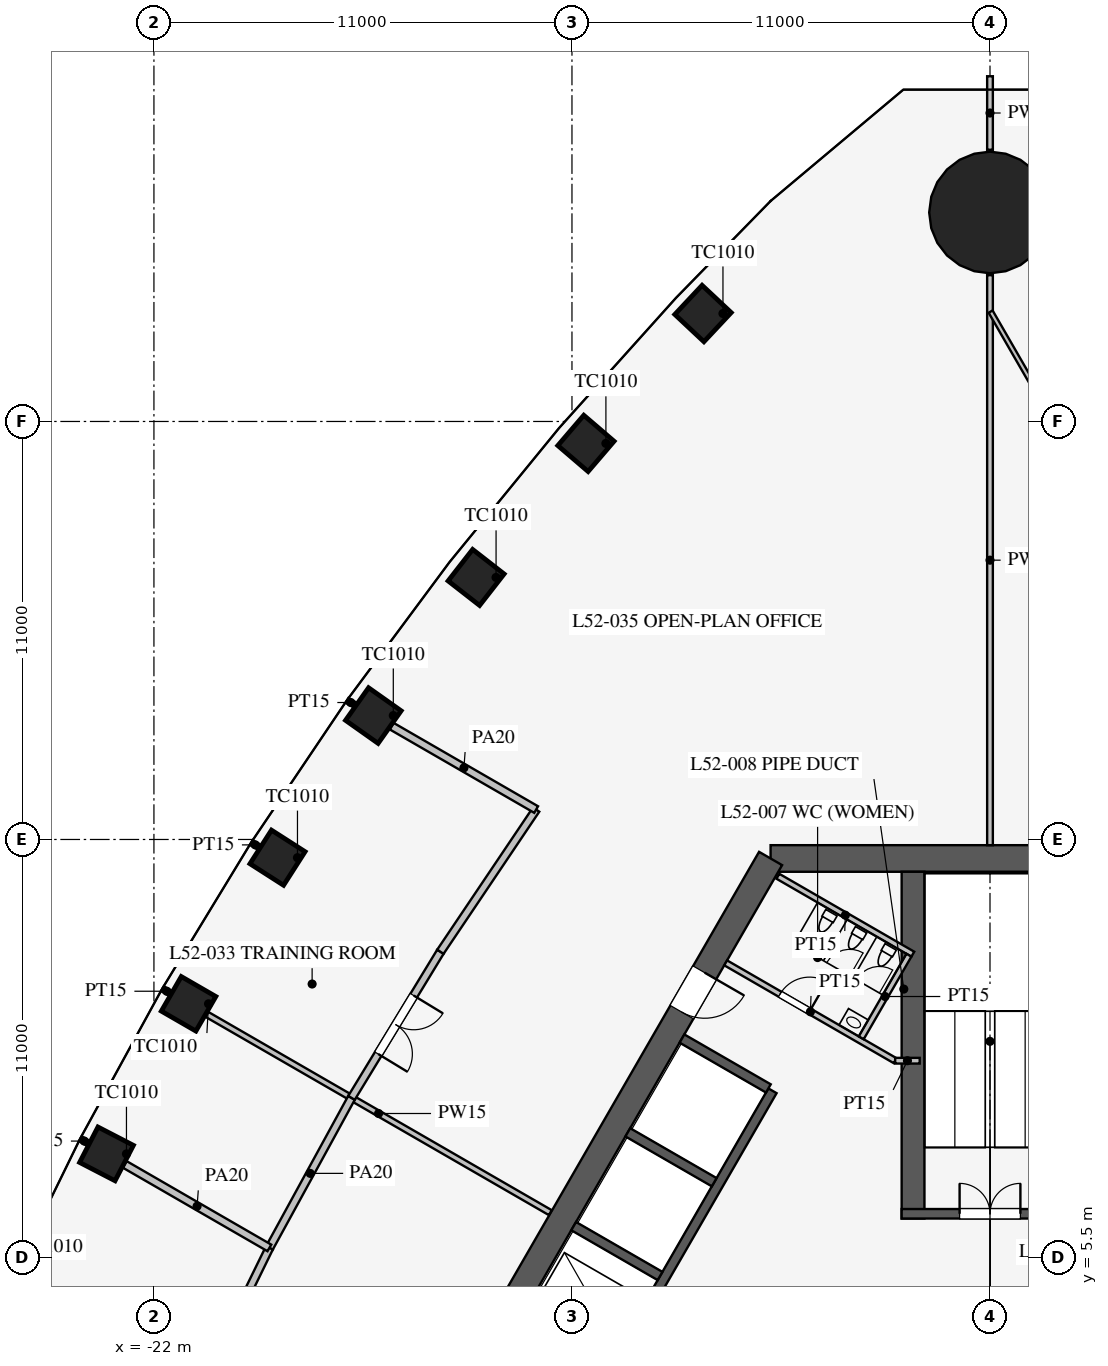
"""IFC4 building model, lengths in metres.
Left out: names, types, materials, properties, quantities, classifications, styles, units other than length and angle.
Written with IfcOpenShell. Run it as: python <this file> out.ifc"""

import sys

from ifc_helpers import new_model, si_unit, direction, frame, frame_2d, origin, origin_2d, place, context, subcontext, project, spatial, rectangle, circle, extrude, element, fill, save


model = new_model("IFC4")
c1 = context("Model", 3, precision=1e-05, world=origin(), true_north=direction((0.0, 1.0)))
c2 = subcontext(c1, "Body", "Model", "MODEL_VIEW")
j1 = project(units=[si_unit("LENGTHUNIT", "METRE"), si_unit("PLANEANGLEUNIT", "RADIAN")], contexts=[c1])
p1 = place(None, origin())
s1 = spatial("IfcSite", under=j1, at=p1, CompositionType="ELEMENT")
p2 = place(p1, origin())
s2 = spatial("IfcBuilding", under=s1, at=p2, CompositionType="ELEMENT")
p3 = place(p2, frame((0.0, 0.0, 227.5)))
s3 = spatial("IfcBuildingStorey", under=s2, at=p3, CompositionType="ELEMENT", Elevation=227.5)
for number, where, z_axis, x_axis in (
    (1, (-7.552, 30.341, 0.0), (0.0, 0.0, 1.0), (-0.684, -0.73, 0.0)),
    (2, (-10.632, 26.923, 0.0), (0.0, 0.0, 1.0), (-0.651, -0.759, 0.0)),
    (3, (-13.522, 23.396, 0.0), (0.0, 0.0, 1.0), (-0.615, -0.789, 0.0)),
    (4, (-16.227, 19.761, 0.0), (0.0, 0.0, 1.0), (-0.577, -0.816, 0.0)),
    (5, (-18.748, 16.02, 0.0), (0.0, 0.0, 1.0), (-0.539, -0.842, 0.0)),
    (6, (-21.088, 12.175, 0.0), (0.0, 0.0, 1.0), (-0.5, -0.866, 0.0)),
    (7, (-23.248, 8.226, 0.0), (0.0, 0.0, 1.0), (-0.46, -0.888, 0.0)),
    (8, (-25.227, 4.172, 0.0), (0.0, 0.0, 1.0), (-0.418, -0.908, 0.0)),
):
    element("IfcColumn", number, at=place(p3, frame(where, z_axis=z_axis, x_axis=x_axis)), inside=s3, PredefinedType="COLUMN", context=c2, shape_type="SweptSolid", body=[
        extrude(rectangle(XDim=1.05, YDim=1.05, at=origin_2d()), origin(), (0.0, 0.0, 1.0), 4.2),
    ])
p4 = place(p3, frame((0.0, 33.0, 0.0), z_axis=(0.0, 0.0, 1.0), x_axis=(1.0, 0.0, 0.0)))
e9 = element("IfcColumn", 9, at=p4, inside=s3, PredefinedType="COLUMN", context=c2, shape_type="SweptSolid", body=[
    extrude(circle(Radius=1.6, at=origin_2d()), origin(), (0.0, 0.0, 1.0), 4.2),
])
p5 = place(p3, frame((5.773, 16.0, 0.0), z_axis=(0.0, 0.0, 1.0), x_axis=(-1.0, 0.0, 0.0)))
e10 = element("IfcWall", 10, at=p5, inside=s3, PredefinedType="SHEAR", context=c2, shape_type="SweptSolid", body=[
    extrude(rectangle(XDim=11.547, YDim=0.7, at=frame_2d((5.773, 0.0))), origin(), (0.0, 0.0, 1.0), 4.2),
])
p6 = place(p3, frame((-5.773, 16.0, 0.0), z_axis=(0.0, 0.0, 1.0), x_axis=(-0.500002442456, -0.866023993627, 0.0)))
e11 = element("IfcWall", 11, at=p6, inside=s3, PredefinedType="SHEAR", context=c2, shape_type="SweptSolid", body=[
    extrude(rectangle(XDim=21.939, YDim=0.7, at=frame_2d((10.97, 0.0))), origin(), (0.0, 0.0, 1.0), 4.2),
])
p7 = place(p6, frame((17.27, 0.0, 0.0)))
e12 = element("IfcOpeningElement", 12, at=p7, cuts=e11, PredefinedType="OPENING", context=c2, shape_type="SweptSolid", body=[
    extrude(rectangle(XDim=1.2, YDim=2.1, at=frame_2d((0.6, 1.05))), frame((0.0, 0.36, 0.0), z_axis=(0.0, -1.0, 0.0), x_axis=(1.0, 0.0, 0.0)), (0.0, 0.0, 1.0), 0.72),
])
p8 = place(p6, frame((3.47, 0.0, 0.0)))
e13 = element("IfcOpeningElement", 13, at=p8, cuts=e11, PredefinedType="OPENING", context=c2, shape_type="SweptSolid", body=[
    extrude(rectangle(XDim=1.2, YDim=2.1, at=frame_2d((0.6, 1.05))), frame((0.0, 0.36, 0.0), z_axis=(0.0, -1.0, 0.0), x_axis=(1.0, 0.0, 0.0)), (0.0, 0.0, 1.0), 0.72),
])
p9 = place(p3, frame((-5.724, 9.886, 0.0), z_axis=(0.0, 0.0, 1.0), x_axis=(-0.500001763848, -0.866024385424, 0.0)))
e14 = element("IfcWall", 14, at=p9, inside=s3, PredefinedType="SHEAR", context=c2, shape_type="SweptSolid", body=[
    extrude(rectangle(XDim=11.4, YDim=0.25, at=frame_2d((5.7, 0.0))), origin(), (0.0, 0.0, 1.0), 4.2),
])
p10 = place(p9, frame((6.525, 0.0, 0.0)))
e15 = element("IfcOpeningElement", 15, at=p10, cuts=e14, PredefinedType="OPENING", context=c2, shape_type="SweptSolid", body=[
    extrude(rectangle(XDim=1.2, YDim=2.2, at=frame_2d((0.6, 1.1))), frame((0.0, 0.135, 0.0), z_axis=(0.0, -1.0, 0.0), x_axis=(1.0, 0.0, 0.0)), (0.0, 0.0, 1.0), 0.27),
])
p11 = place(p9, frame((9.375, 0.0, 0.0)))
e16 = element("IfcOpeningElement", 16, at=p11, cuts=e14, PredefinedType="OPENING", context=c2, shape_type="SweptSolid", body=[
    extrude(rectangle(XDim=1.2, YDim=2.2, at=frame_2d((0.6, 1.1))), frame((0.0, 0.135, 0.0), z_axis=(0.0, -1.0, 0.0), x_axis=(1.0, 0.0, 0.0)), (0.0, 0.0, 1.0), 0.27),
])
for number, where, z_axis, x_axis in (
    (17, (-5.832, 9.949, 0.0), (0.0, 0.0, 1.0), (-0.866, 0.5, 0.0)),
    (18, (-7.257, 7.481, 0.0), (0.0, 0.0, 1.0), (-0.866, 0.5, 0.0)),
    (19, (-8.682, 5.012, 0.0), (0.0, 0.0, 1.0), (-0.866, 0.5, 0.0)),
):
    element("IfcWall", number, at=place(p3, frame(where, z_axis=z_axis, x_axis=x_axis)), inside=s3, PredefinedType="SHEAR", context=c2, shape_type="SweptSolid", body=[
        extrude(rectangle(XDim=2.625, YDim=0.25, at=frame_2d((1.312, 0.0))), origin(), (0.0, 0.0, 1.0), 4.2),
    ])
p12 = place(p3, frame((-2.025, 6.525, 0.0), z_axis=(0.0, 0.0, 1.0), x_axis=(0.0, 1.0, 0.0)))
e20 = element("IfcWall", 20, at=p12, inside=s3, PredefinedType="SHEAR", context=c2, shape_type="SweptSolid", body=[
    extrude(rectangle(XDim=9.125, YDim=0.6, at=frame_2d((4.562, 0.0))), origin(), (0.0, 0.0, 1.0), 4.2),
])
p13 = place(p3, frame((2.325, 6.65, 0.0), z_axis=(0.0, 0.0, 1.0), x_axis=(-1.0, 0.0, 0.0)))
e21 = element("IfcWall", 21, at=p13, inside=s3, PredefinedType="SHEAR", context=c2, shape_type="SweptSolid", body=[
    extrude(rectangle(XDim=4.65, YDim=0.25, at=frame_2d((2.325, 0.0))), origin(), (0.0, 0.0, 1.0), 4.2),
])
p14 = place(p13, frame((1.525, 0.0, 0.0)))
e22 = element("IfcOpeningElement", 22, at=p14, cuts=e21, PredefinedType="OPENING", context=c2, shape_type="SweptSolid", body=[
    extrude(rectangle(XDim=1.6, YDim=2.1, at=frame_2d((0.8, 1.05))), frame((0.0, 0.135, 0.0), z_axis=(0.0, -1.0, 0.0), x_axis=(1.0, 0.0, 0.0)), (0.0, 0.0, 1.0), 0.27),
])
p15 = place(p3, frame((-2.495, 10.678, 0.0), z_axis=(0.0, 0.0, 1.0), x_axis=(-0.866037967349, 0.499978238636, 0.0)))
e23 = element("IfcWall", 23, at=p15, inside=s3, PredefinedType="PARTITIONING", context=c2, shape_type="SweptSolid", body=[
    extrude(rectangle(XDim=5.15, YDim=0.15, at=frame_2d((2.575, 0.0))), origin(), (0.0, 0.0, 1.0), 4.0),
])
p16 = place(p15, frame((2.6, 0.0, 0.0)))
e24 = element("IfcOpeningElement", 24, at=p16, cuts=e23, PredefinedType="OPENING", context=c2, shape_type="SweptSolid", body=[
    extrude(rectangle(XDim=0.9, YDim=2.1, at=frame_2d((0.45, 1.05))), frame((0.0, 0.085, 0.0), z_axis=(0.0, -1.0, 0.0), x_axis=(1.0, 0.0, 0.0)), (0.0, 0.0, 1.0), 0.17),
])
p17 = place(p3, frame((-2.495, 10.678, 0.0), z_axis=(0.0, 0.0, 1.0), x_axis=(1.0, 0.0, 0.0)))
e25 = element("IfcWall", 25, at=p17, inside=s3, PredefinedType="PARTITIONING", context=c2, shape_type="SweptSolid", body=[
    extrude(rectangle(XDim=0.645, YDim=0.15, at=frame_2d((0.323, 0.0))), origin(), (0.0, 0.0, 1.0), 4.0),
])
p18 = place(p3, frame((-2.031, 13.482, 0.0), z_axis=(0.0, 0.0, 1.0), x_axis=(-0.866050731258, 0.499956128963, 0.0)))
e26 = element("IfcWall", 26, at=p18, inside=s3, PredefinedType="PARTITIONING", context=c2, shape_type="SweptSolid", body=[
    extrude(rectangle(XDim=4.1, YDim=0.15, at=frame_2d((2.05, 0.0))), origin(), (0.0, 0.0, 1.0), 4.0),
])
p19 = place(p3, frame((-3.389, 11.281, 0.0), z_axis=(0.0, 0.0, 1.0), x_axis=(0.499989096993, 0.866031698547, 0.0)))
e27 = element("IfcWall", 27, at=p19, inside=s3, PredefinedType="PARTITIONING", context=c2, shape_type="SweptSolid", body=[
    extrude(rectangle(XDim=2.51, YDim=0.15, at=frame_2d((1.255, 0.0))), origin(), (0.0, 0.0, 1.0), 4.0),
])
p20 = place(p3, frame((0.0, 16.35, 0.0), z_axis=(0.0, 0.0, 1.0), x_axis=(0.0, 1.0, 0.0)))
e28 = element("IfcWall", 28, at=p20, inside=s3, PredefinedType="PARTITIONING", context=c2, shape_type="SweptSolid", body=[
    extrude(rectangle(XDim=15.0, YDim=0.15, at=frame_2d((7.5, 0.0))), origin(), (0.0, 0.0, 1.0), 2.4),
])
p21 = place(p3, frame((0.0, 34.65, 0.0), z_axis=(0.0, 0.0, 1.0), x_axis=(0.0, 1.0, 0.0)))
e29 = element("IfcWall", 29, at=p21, inside=s3, PredefinedType="PARTITIONING", context=c2, shape_type="SweptSolid", body=[
    extrude(rectangle(XDim=1.935, YDim=0.15, at=frame_2d((0.967, 0.0))), origin(), (0.0, 0.0, 1.0), 2.4),
])
p22 = place(p3, frame((26.328, -15.182, 0.0), z_axis=(0.0, 0.0, 1.0), x_axis=(-0.500000626146, 0.866025042278, 0.0)))
e30 = element("IfcWall", 30, at=p22, inside=s3, PredefinedType="PARTITIONING", context=c2, shape_type="SweptSolid", body=[
    extrude(rectangle(XDim=52.624, YDim=0.12, at=frame_2d((26.312, 0.0))), origin(), (0.0, 0.0, 1.0), 2.9),
])
p23 = place(p22, frame((10.15, 0.0, 0.15)))
e31 = element("IfcOpeningElement", 31, at=p23, cuts=e30, PredefinedType="OPENING", context=c2, shape_type="SweptSolid", body=[
    extrude(rectangle(XDim=1.8, YDim=2.1, at=frame_2d((0.9, 1.05))), frame((0.0, 0.07, 0.0), z_axis=(0.0, -1.0, 0.0), x_axis=(1.0, 0.0, 0.0)), (0.0, 0.0, 1.0), 0.14),
])
p24 = place(p22, frame((40.65, 0.0, 0.15)))
e32 = element("IfcOpeningElement", 32, at=p24, cuts=e30, PredefinedType="OPENING", context=c2, shape_type="SweptSolid", body=[
    extrude(rectangle(XDim=1.8, YDim=2.1, at=frame_2d((0.9, 1.05))), frame((0.0, 0.07, 0.0), z_axis=(0.0, -1.0, 0.0), x_axis=(1.0, 0.0, 0.0)), (0.0, 0.0, 1.0), 0.14),
])
p25 = place(p3, frame((-11.57, 6.68, 0.0), z_axis=(0.0, 0.0, 1.0), x_axis=(-0.866028972293, 0.499993819111, 0.0)))
e33 = element("IfcWall", 33, at=p25, inside=s3, PredefinedType="PARTITIONING", context=c2, shape_type="SweptSolid", body=[
    extrude(rectangle(XDim=10.436, YDim=0.15, at=frame_2d((5.218, 0.0))), origin(), (0.0, 0.0, 1.0), 3.3),
])
p26 = place(p3, frame((-21.546, 12.44, 0.0), z_axis=(0.0, 0.0, 1.0), x_axis=(-0.866032814021, 0.499987164874, 0.0)))
e34 = element("IfcWall", 34, at=p26, inside=s3, PredefinedType="PARTITIONING", context=c2, shape_type="SweptSolid", body=[
    extrude(rectangle(XDim=0.266, YDim=0.15, at=frame_2d((0.133, 0.0))), origin(), (0.0, 0.0, 1.0), 2.9),
])
for number, where, z_axis, x_axis in (
    (35, (-23.727, 8.502, 0.0), (0.0, 0.0, 1.0), (-0.866, 0.5, 0.0)),
    (36, (-19.227, 16.297, 0.0), (0.0, 0.0, 1.0), (-0.866, 0.5, 0.0)),
):
    element("IfcWall", number, at=place(p3, frame(where, z_axis=z_axis, x_axis=x_axis)), inside=s3, PredefinedType="PARTITIONING", context=c2, shape_type="SweptSolid", body=[
        extrude(rectangle(XDim=0.243, YDim=0.15, at=frame_2d((0.122, 0.0))), origin(), (0.0, 0.0, 1.0), 2.9),
    ])
p27 = place(p3, frame((-16.725, 20.048, 0.0), z_axis=(0.0, 0.0, 1.0), x_axis=(-0.866149170119, 0.499785569122, 0.0)))
e37 = element("IfcWall", 37, at=p27, inside=s3, PredefinedType="PARTITIONING", context=c2, shape_type="SweptSolid", body=[
    extrude(rectangle(XDim=0.223, YDim=0.15, at=frame_2d((0.112, 0.0))), origin(), (0.0, 0.0, 1.0), 2.9),
])
p28 = place(p3, frame((-16.802, 9.7, 0.0), z_axis=(0.0, 0.0, 1.0), x_axis=(-0.479949984371, -0.877295852322, 0.0)))
e38 = element("IfcWall", 38, at=p28, inside=s3, PredefinedType="PARTITIONING", context=c2, shape_type="SweptSolid", body=[
    extrude(rectangle(XDim=4.501, YDim=0.2, at=frame_2d((2.25, 0.0))), origin(), (0.0, 0.0, 1.0), 2.9),
])
p29 = place(p3, frame((-18.962, 5.751, 0.0), z_axis=(0.0, 0.0, 1.0), x_axis=(-0.43911984878, -0.898428493764, 0.0)))
e39 = element("IfcWall", 39, at=p29, inside=s3, PredefinedType="PARTITIONING", context=c2, shape_type="SweptSolid", body=[
    extrude(rectangle(XDim=4.511, YDim=0.2, at=frame_2d((2.255, 0.0))), origin(), (0.0, 0.0, 1.0), 2.9),
])
p30 = place(p3, frame((-14.462, 13.546, 0.0), z_axis=(0.0, 0.0, 1.0), x_axis=(-0.519790350351, -0.85429385558, 0.0)))
e40 = element("IfcWall", 40, at=p30, inside=s3, PredefinedType="PARTITIONING", context=c2, shape_type="SweptSolid", body=[
    extrude(rectangle(XDim=4.501, YDim=0.2, at=frame_2d((2.25, 0.0))), origin(), (0.0, 0.0, 1.0), 2.9),
])
p31 = place(p30, frame((1.35, 0.0, 0.15)))
e41 = element("IfcOpeningElement", 41, at=p31, cuts=e40, PredefinedType="OPENING", context=c2, shape_type="SweptSolid", body=[
    extrude(rectangle(XDim=1.8, YDim=2.1, at=frame_2d((0.9, 1.05))), frame((0.0, 0.11, 0.0), z_axis=(0.0, -1.0, 0.0), x_axis=(1.0, 0.0, 0.0)), (0.0, 0.0, 1.0), 0.22),
])
p32 = place(p3, frame((-11.943, 17.287, 0.0), z_axis=(0.0, 0.0, 1.0), x_axis=(-0.55850386778, -0.829501916619, 0.0)))
e42 = element("IfcWall", 42, at=p32, inside=s3, PredefinedType="PARTITIONING", context=c2, shape_type="SweptSolid", body=[
    extrude(rectangle(XDim=4.511, YDim=0.2, at=frame_2d((2.255, 0.0))), origin(), (0.0, 0.0, 1.0), 2.9),
])
p33 = place(p3, frame((-18.962, 5.751, 0.0), z_axis=(0.0, 0.0, 1.0), x_axis=(-0.866025498715, 0.499999835575, 0.0)))
e43 = element("IfcWall", 43, at=p33, inside=s3, PredefinedType="PARTITIONING", context=c2, shape_type="SweptSolid", body=[
    extrude(rectangle(XDim=4.394, YDim=0.2, at=frame_2d((2.197, 0.0))), origin(), (0.0, 0.0, 1.0), 2.9),
])
p34 = place(p3, frame((-11.943, 17.287, 0.0), z_axis=(0.0, 0.0, 1.0), x_axis=(-0.86600959659, 0.500027377864, 0.0)))
e44 = element("IfcWall", 44, at=p34, inside=s3, PredefinedType="PARTITIONING", context=c2, shape_type="SweptSolid", body=[
    extrude(rectangle(XDim=4.389, YDim=0.2, at=frame_2d((2.195, 0.0))), origin(), (0.0, 0.0, 1.0), 2.9),
])
p35 = place(p16, frame((0.9, 0.0, 0.0), z_axis=(0.0, 0.0, 1.0), x_axis=(-1.0, 0.0, 0.0)))
e45 = element("IfcDoor", 45, at=p35, inside=s3, OperationType="SINGLE_SWING_RIGHT", PredefinedType="DOOR", context=c2, shape_type="SweptSolid", body=[
    extrude(rectangle(XDim=0.9, YDim=2.1, at=frame_2d((0.45, 1.05))), frame((0.0, 0.025, 0.0), z_axis=(0.0, -1.0, 0.0), x_axis=(1.0, 0.0, 0.0)), (0.0, 0.0, 1.0), 0.05),
])
fill(e24, e45)
p36 = place(p14, frame((1.6, 0.0, 0.0), z_axis=(0.0, 0.0, 1.0), x_axis=(-1.0, 0.0, 0.0)))
e46 = element("IfcDoor", 46, at=p36, inside=s3, OperationType="DOUBLE_DOOR_SINGLE_SWING", PredefinedType="DOOR", context=c2, shape_type="SweptSolid", body=[
    extrude(rectangle(XDim=1.6, YDim=2.1, at=frame_2d((0.8, 1.05))), frame((0.0, 0.025, 0.0), z_axis=(0.0, -1.0, 0.0), x_axis=(1.0, 0.0, 0.0)), (0.0, 0.0, 1.0), 0.05),
])
fill(e22, e46)
p37 = place(p8, origin())
e47 = element("IfcDoor", 47, at=p37, inside=s3, OperationType="SINGLE_SWING_LEFT", PredefinedType="DOOR", context=c2, shape_type="SweptSolid", body=[
    extrude(rectangle(XDim=1.2, YDim=2.1, at=frame_2d((0.6, 1.05))), frame((0.0, 0.025, 0.0), z_axis=(0.0, -1.0, 0.0), x_axis=(1.0, 0.0, 0.0)), (0.0, 0.0, 1.0), 0.05),
])
fill(e13, e47)
p38 = place(p31, origin())
e48 = element("IfcDoor", 48, at=p38, inside=s3, OperationType="DOUBLE_DOOR_SINGLE_SWING", PredefinedType="DOOR", context=c2, shape_type="SweptSolid", body=[
    extrude(rectangle(XDim=1.8, YDim=2.1, at=frame_2d((0.9, 1.05))), frame((0.0, 0.025, 0.0), z_axis=(0.0, -1.0, 0.0), x_axis=(1.0, 0.0, 0.0)), (0.0, 0.0, 1.0), 0.05),
])
fill(e41, e48)
save(model, sys.argv[1])
